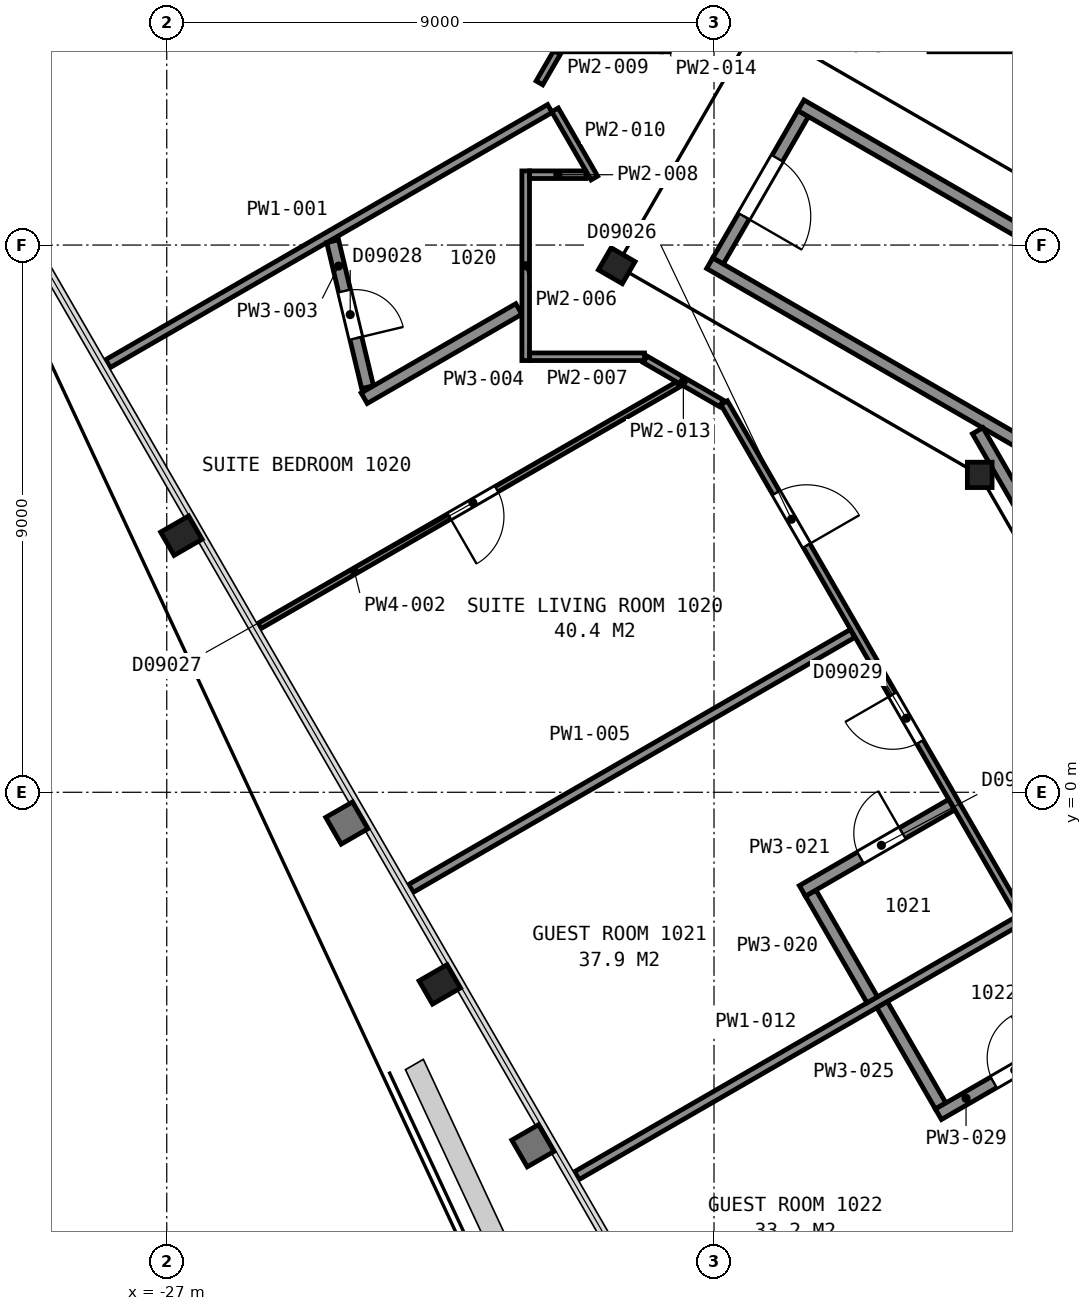
"""IFC4 building model, lengths in metres.
Left out: names, types, materials, properties, quantities, classifications, styles, units other than length and angle.
Written with IfcOpenShell. Run it as: python <this file> out.ifc"""

import sys

from ifc_helpers import new_model, si_unit, direction, frame, frame_2d, origin, origin_2d, place, context, subcontext, project, spatial, rectangle, i_section, extrude, element, fill, save


model = new_model("IFC4")
c1 = context("Model", 3, precision=1e-05, world=origin(), true_north=direction((0.0, 1.0)))
c2 = subcontext(c1, "Body", "Model", "MODEL_VIEW")
j1 = project(units=[si_unit("LENGTHUNIT", "METRE"), si_unit("PLANEANGLEUNIT", "RADIAN")], contexts=[c1])
p1 = place(None, origin())
s1 = spatial("IfcSite", under=j1, at=p1, CompositionType="ELEMENT")
p2 = place(p1, origin())
s2 = spatial("IfcBuilding", under=s1, at=p2, CompositionType="ELEMENT")
p3 = place(p2, frame((0.0, 0.0, 51.2)))
s3 = spatial("IfcBuildingStorey", under=s2, at=p3, CompositionType="ELEMENT", Elevation=51.2)
for number, where, z_axis, x_axis in (
    (1, (-26.76, 4.22, 0.0), (0.0, 0.0, 1.0), (-0.5, 0.866, 0.0)),
    (2, (-22.51, -3.16, 0.0), (0.0, 0.0, 1.0), (-0.5, 0.866, 0.0)),
):
    element("IfcColumn", number, at=place(p3, frame(where, z_axis=z_axis, x_axis=x_axis)), inside=s3, PredefinedType="COLUMN", context=c2, shape_type="SweptSolid", body=[
        extrude(i_section(OverallWidth=0.442, OverallDepth=0.531, WebThickness=0.066, FlangeThickness=0.106, FilletRadius=0.015, at=origin_2d()), origin(), (0.0, 0.0, 1.0), 3.6),
    ])
p4 = place(p3, frame((-19.6, 8.66, 0.0), z_axis=(0.0, 0.0, 1.0), x_axis=(0.5, 0.866025403784, 0.0)))
e3 = element("IfcColumn", 3, at=p4, inside=s3, PredefinedType="COLUMN", context=c2, shape_type="SweptSolid", body=[
    extrude(i_section(OverallWidth=0.419, OverallDepth=0.455, WebThickness=0.042, FlangeThickness=0.068, FilletRadius=0.015, at=origin_2d()), origin(), (0.0, 0.0, 1.0), 3.6),
])
p5 = place(p3, frame((-13.63, 5.22, 0.0), z_axis=(0.0, 0.0, 1.0), x_axis=(1.0, 0.0, 0.0)))
e4 = element("IfcColumn", 4, at=p5, inside=s3, PredefinedType="COLUMN", context=c2, shape_type="SweptSolid", body=[
    extrude(i_section(OverallWidth=0.406, OverallDepth=0.417, WebThickness=0.03, FlangeThickness=0.048, FilletRadius=0.015, at=origin_2d()), origin(), (0.0, 0.0, 1.0), 3.6),
])
p6 = place(p3, frame((-16.534, 11.162, 0.0), z_axis=(0.0, 0.0, 1.0), x_axis=(-0.49998411664, -0.866034573852, 0.0)))
e5 = element("IfcWall", 5, at=p6, inside=s3, PredefinedType="PARTITIONING", context=c2, shape_type="SweptSolid", body=[
    extrude(rectangle(XDim=2.8, YDim=0.2, at=frame_2d((1.4, 0.0))), origin(), (0.0, 0.0, 1.0), 3.35),
])
p7 = place(p6, frame((0.85, 0.0, 0.0)))
e6 = element("IfcOpeningElement", 6, at=p7, cuts=e5, PredefinedType="OPENING", context=c2, shape_type="SweptSolid", body=[
    extrude(rectangle(XDim=1.1, YDim=2.1, at=frame_2d((0.55, 1.05))), frame((0.0, 0.11, 0.0), z_axis=(0.0, -1.0, 0.0), x_axis=(1.0, 0.0, 0.0)), (0.0, 0.0, 1.0), 0.22),
])
for number, where, z_axis, x_axis in (
    (7, (-7.678, 2.701, 0.0), (0.0, 0.0, 1.0), (-0.866, 0.5, 0.0)),
    (8, (-6.178, 5.299, 0.0), (0.0, 0.0, 1.0), (-0.866, 0.5, 0.0)),
):
    element("IfcWall", number, at=place(p3, frame(where, z_axis=z_axis, x_axis=x_axis)), inside=s3, PredefinedType="PARTITIONING", context=c2, shape_type="SweptSolid", body=[
        extrude(rectangle(XDim=12.0, YDim=0.2, at=frame_2d((6.0, 0.0))), origin(), (0.0, 0.0, 1.0), 3.35),
    ])
p8 = place(p3, frame((-13.664, 5.946, 0.0), z_axis=(0.0, 0.0, 1.0), x_axis=(0.499994327219, -0.866028678941, 0.0)))
e9 = element("IfcWall", 9, at=p8, inside=s3, PredefinedType="PARTITIONING", context=c2, shape_type="SweptSolid", body=[
    extrude(rectangle(XDim=23.968, YDim=0.2, at=frame_2d((11.984, 0.0))), origin(), (0.0, 0.0, 1.0), 3.35),
])
p9 = place(p3, frame((-27.967, 7.05, 0.0), z_axis=(0.0, 0.0, 1.0), x_axis=(0.86603249375, 0.499987719618, 0.0)))
e10 = element("IfcWall", 10, at=p9, inside=s3, PredefinedType="PARTITIONING", context=c2, shape_type="SweptSolid", body=[
    extrude(rectangle(XDim=8.392, YDim=0.15, at=frame_2d((4.196, 0.0))), origin(), (0.0, 0.0, 1.0), 2.613),
])
p10 = place(p3, frame((-25.476, 2.735, 0.0), z_axis=(0.0, 0.0, 1.0), x_axis=(0.866077639848, 0.499909513568, 0.0)))
e11 = element("IfcWall", 11, at=p10, inside=s3, PredefinedType="PARTITIONING", context=c2, shape_type="SweptSolid", body=[
    extrude(rectangle(XDim=7.946, YDim=0.1, at=frame_2d((3.973, 0.0))), origin(), (0.0, 0.0, 1.0), 2.613),
])
p11 = place(p10, frame((3.604, 0.0, 0.0)))
e12 = element("IfcOpeningElement", 12, at=p11, cuts=e11, PredefinedType="OPENING", context=c2, shape_type="SweptSolid", body=[
    extrude(rectangle(XDim=0.9, YDim=2.1, at=frame_2d((0.45, 1.05))), frame((0.0, 0.06, 0.0), z_axis=(0.0, -1.0, 0.0), x_axis=(1.0, 0.0, 0.0)), (0.0, 0.0, 1.0), 0.12),
])
p12 = place(p3, frame((-24.272, 9.064, 0.0), z_axis=(0.0, 0.0, 1.0), x_axis=(0.232636237171, -0.972563818551, 0.0)))
e13 = element("IfcWall", 13, at=p12, inside=s3, PredefinedType="PARTITIONING", context=c2, shape_type="SweptSolid", body=[
    extrude(rectangle(XDim=2.469, YDim=0.2, at=frame_2d((1.235, 0.0))), origin(), (0.0, 0.0, 1.0), 2.613),
])
p13 = place(p12, frame((0.842, 0.0, 0.0)))
e14 = element("IfcOpeningElement", 14, at=p13, cuts=e13, PredefinedType="OPENING", context=c2, shape_type="SweptSolid", body=[
    extrude(rectangle(XDim=0.8, YDim=2.1, at=frame_2d((0.4, 1.05))), frame((0.0, 0.11, 0.0), z_axis=(0.0, -1.0, 0.0), x_axis=(1.0, 0.0, 0.0)), (0.0, 0.0, 1.0), 0.22),
])
p14 = place(p3, frame((-23.753, 6.481, 0.0), z_axis=(0.0, 0.0, 1.0), x_axis=(0.866070680301, 0.499921570572, 0.0)))
e15 = element("IfcWall", 15, at=p14, inside=s3, PredefinedType="PARTITIONING", context=c2, shape_type="SweptSolid", body=[
    extrude(rectangle(XDim=2.937, YDim=0.2, at=frame_2d((1.468, 0.0))), origin(), (0.0, 0.0, 1.0), 2.613),
])
p15 = place(p3, frame((-22.984, -1.581, 0.0), z_axis=(0.0, 0.0, 1.0), x_axis=(0.866040157966, 0.499974444137, 0.0)))
e16 = element("IfcWall", 16, at=p15, inside=s3, PredefinedType="PARTITIONING", context=c2, shape_type="SweptSolid", body=[
    extrude(rectangle(XDim=8.387, YDim=0.15, at=frame_2d((4.193, 0.0))), origin(), (0.0, 0.0, 1.0), 2.613),
])
p16 = place(p3, frame((-21.097, 7.101, 0.0), z_axis=(0.0, 0.0, 1.0), x_axis=(0.0, 1.0, 0.0)))
e17 = element("IfcWall", 17, at=p16, inside=s3, PredefinedType="PARTITIONING", context=c2, shape_type="SweptSolid", body=[
    extrude(rectangle(XDim=3.119, YDim=0.125, at=frame_2d((1.56, 0.0))), origin(), (0.0, 0.0, 1.0), 2.613),
])
p17 = place(p3, frame((-21.032, 7.163, 0.0), z_axis=(0.0, 0.0, 1.0), x_axis=(1.0, 0.0, 0.0)))
e18 = element("IfcWall", 18, at=p17, inside=s3, PredefinedType="PARTITIONING", context=c2, shape_type="SweptSolid", body=[
    extrude(rectangle(XDim=1.888, YDim=0.125, at=frame_2d((0.944, 0.0))), origin(), (0.0, 0.0, 1.0), 2.613),
])
p18 = place(p3, frame((-21.032, 10.157, 0.0), z_axis=(0.0, 0.0, 1.0), x_axis=(1.0, 0.0, 0.0)))
e19 = element("IfcWall", 19, at=p18, inside=s3, PredefinedType="PARTITIONING", context=c2, shape_type="SweptSolid", body=[
    extrude(rectangle(XDim=0.928, YDim=0.125, at=frame_2d((0.464, 0.0))), origin(), (0.0, 0.0, 1.0), 2.613),
])
p19 = place(p3, frame((-20.871, 11.667, 0.0), z_axis=(0.0, 0.0, 1.0), x_axis=(0.500769941337, 0.865580421367, 0.0)))
e20 = element("IfcWall", 20, at=p19, inside=s3, PredefinedType="PARTITIONING", context=c2, shape_type="SweptSolid", body=[
    extrude(rectangle(XDim=0.578, YDim=0.125, at=frame_2d((0.289, 0.0))), origin(), (0.0, 0.0, 1.0), 2.613),
])
p20 = place(p3, frame((-20.615, 11.223, 0.0), z_axis=(0.0, 0.0, 1.0), x_axis=(0.500076370288, -0.865981306888, 0.0)))
e21 = element("IfcWall", 21, at=p20, inside=s3, PredefinedType="PARTITIONING", context=c2, shape_type="SweptSolid", body=[
    extrude(rectangle(XDim=1.294, YDim=0.125, at=frame_2d((0.647, 0.0))), origin(), (0.0, 0.0, 1.0), 2.613),
])
p21 = place(p3, frame((-20.602, 12.241, 0.0), z_axis=(0.0, 0.0, 1.0), x_axis=(1.0, 0.0, 0.0)))
e22 = element("IfcWall", 22, at=p21, inside=s3, PredefinedType="PARTITIONING", context=c2, shape_type="SweptSolid", body=[
    extrude(rectangle(XDim=1.74, YDim=0.125, at=frame_2d((0.87, 0.0))), origin(), (0.0, 0.0, 1.0), 2.613),
])
p22 = place(p3, frame((-20.256, -6.305, 0.0), z_axis=(0.0, 0.0, 1.0), x_axis=(0.866037818403, 0.499978496633, 0.0)))
e23 = element("IfcWall", 23, at=p22, inside=s3, PredefinedType="PARTITIONING", context=c2, shape_type="SweptSolid", body=[
    extrude(rectangle(XDim=8.391, YDim=0.15, at=frame_2d((4.196, 0.0))), origin(), (0.0, 0.0, 1.0), 2.613),
])
p23 = place(p3, frame((-19.132, 7.121, 0.0), z_axis=(0.0, 0.0, 1.0), x_axis=(0.865894215669, -0.500227155672, 0.0)))
e24 = element("IfcWall", 24, at=p23, inside=s3, PredefinedType="PARTITIONING", context=c2, shape_type="SweptSolid", body=[
    extrude(rectangle(XDim=1.451, YDim=0.125, at=frame_2d((0.726, 0.0))), origin(), (0.0, 0.0, 1.0), 2.613),
])
p24 = place(p3, frame((-18.797, 12.178, 0.0), z_axis=(0.0, 0.0, 1.0), x_axis=(0.0, 1.0, 0.0)))
e25 = element("IfcWall", 25, at=p24, inside=s3, PredefinedType="PARTITIONING", context=c2, shape_type="SweptSolid", body=[
    extrude(rectangle(XDim=1.894, YDim=0.125, at=frame_2d((0.947, 0.0))), origin(), (0.0, 0.0, 1.0), 2.613),
])
p25 = place(p24, frame((0.562, 0.0, 0.0)))
e26 = element("IfcOpeningElement", 26, at=p25, cuts=e25, PredefinedType="OPENING", context=c2, shape_type="SweptSolid", body=[
    extrude(rectangle(XDim=0.9, YDim=2.1, at=frame_2d((0.45, 1.05))), frame((0.0, 0.073, 0.0), z_axis=(0.0, -1.0, 0.0), x_axis=(1.0, 0.0, 0.0)), (0.0, 0.0, 1.0), 0.145),
])
p26 = place(p3, frame((-3.766, -17.959, 0.0), z_axis=(0.0, 0.0, 1.0), x_axis=(-0.500002884005, 0.866023738697, 0.0)))
e27 = element("IfcWall", 27, at=p26, inside=s3, PredefinedType="PARTITIONING", context=c2, shape_type="SweptSolid", body=[
    extrude(rectangle(XDim=28.135, YDim=0.125, at=frame_2d((14.067, 0.0))), origin(), (0.0, 0.0, 1.0), 2.613),
])
p27 = place(p26, frame((25.422, 0.0, 0.0)))
e28 = element("IfcOpeningElement", 28, at=p27, cuts=e27, PredefinedType="OPENING", context=c2, shape_type="SweptSolid", body=[
    extrude(rectangle(XDim=1.0, YDim=2.1, at=frame_2d((0.5, 1.05))), frame((0.0, 0.073, 0.0), z_axis=(0.0, -1.0, 0.0), x_axis=(1.0, 0.0, 0.0)), (0.0, 0.0, 1.0), 0.145),
])
p28 = place(p26, frame((21.693, 0.0, 0.0)))
e29 = element("IfcOpeningElement", 29, at=p28, cuts=e27, PredefinedType="OPENING", context=c2, shape_type="SweptSolid", body=[
    extrude(rectangle(XDim=0.9, YDim=2.1, at=frame_2d((0.45, 1.05))), frame((0.0, 0.073, 0.0), z_axis=(0.0, -1.0, 0.0), x_axis=(1.0, 0.0, 0.0)), (0.0, 0.0, 1.0), 0.145),
])
p29 = place(p26, frame((14.438, 0.0, 0.0)))
e30 = element("IfcOpeningElement", 30, at=p29, cuts=e27, PredefinedType="OPENING", context=c2, shape_type="SweptSolid", body=[
    extrude(rectangle(XDim=0.9, YDim=2.1, at=frame_2d((0.45, 1.05))), frame((0.0, 0.073, 0.0), z_axis=(0.0, -1.0, 0.0), x_axis=(1.0, 0.0, 0.0)), (0.0, 0.0, 1.0), 0.145),
])
p30 = place(p26, frame((11.712, 0.0, 0.0)))
e31 = element("IfcOpeningElement", 31, at=p30, cuts=e27, PredefinedType="OPENING", context=c2, shape_type="SweptSolid", body=[
    extrude(rectangle(XDim=0.9, YDim=2.1, at=frame_2d((0.45, 1.05))), frame((0.0, 0.073, 0.0), z_axis=(0.0, -1.0, 0.0), x_axis=(1.0, 0.0, 0.0)), (0.0, 0.0, 1.0), 0.145),
])
p31 = place(p26, frame((4.787, 0.0, 0.0)))
e32 = element("IfcOpeningElement", 32, at=p31, cuts=e27, PredefinedType="OPENING", context=c2, shape_type="SweptSolid", body=[
    extrude(rectangle(XDim=0.9, YDim=2.1, at=frame_2d((0.45, 1.05))), frame((0.0, 0.073, 0.0), z_axis=(0.0, -1.0, 0.0), x_axis=(1.0, 0.0, 0.0)), (0.0, 0.0, 1.0), 0.145),
])
p32 = place(p26, frame((1.762, 0.0, 0.0)))
e33 = element("IfcOpeningElement", 33, at=p32, cuts=e27, PredefinedType="OPENING", context=c2, shape_type="SweptSolid", body=[
    extrude(rectangle(XDim=0.9, YDim=2.1, at=frame_2d((0.45, 1.05))), frame((0.0, 0.073, 0.0), z_axis=(0.0, -1.0, 0.0), x_axis=(1.0, 0.0, 0.0)), (0.0, 0.0, 1.0), 0.145),
])
p33 = place(p3, frame((-17.844, -10.484, 0.0), z_axis=(0.0, 0.0, 1.0), x_axis=(0.866037818403, 0.499978496633, 0.0)))
e34 = element("IfcWall", 34, at=p33, inside=s3, PredefinedType="PARTITIONING", context=c2, shape_type="SweptSolid", body=[
    extrude(rectangle(XDim=8.391, YDim=0.15, at=frame_2d((4.196, 0.0))), origin(), (0.0, 0.0, 1.0), 2.613),
])
p34 = place(p3, frame((-16.41, -1.659, 0.0), z_axis=(0.0, 0.0, 1.0), x_axis=(0.49983374806, -0.866121368112, 0.0)))
e35 = element("IfcWall", 35, at=p34, inside=s3, PredefinedType="PARTITIONING", context=c2, shape_type="SweptSolid", body=[
    extrude(rectangle(XDim=2.026, YDim=0.2, at=frame_2d((1.013, 0.0))), origin(), (0.0, 0.0, 1.0), 2.613),
])
p35 = place(p3, frame((-14.094, -0.206, 0.0), z_axis=(0.0, 0.0, 1.0), x_axis=(-0.866033446572, -0.499986069224, 0.0)))
e36 = element("IfcWall", 36, at=p35, inside=s3, PredefinedType="PARTITIONING", context=c2, shape_type="SweptSolid", body=[
    extrude(rectangle(XDim=2.833, YDim=0.2, at=frame_2d((1.416, 0.0))), origin(), (0.0, 0.0, 1.0), 2.613),
])
p36 = place(p35, frame((0.933, 0.0, 0.0)))
e37 = element("IfcOpeningElement", 37, at=p36, cuts=e36, PredefinedType="OPENING", context=c2, shape_type="SweptSolid", body=[
    extrude(rectangle(XDim=0.8, YDim=2.1, at=frame_2d((0.4, 1.05))), frame((0.0, 0.11, 0.0), z_axis=(0.0, -1.0, 0.0), x_axis=(1.0, 0.0, 0.0)), (0.0, 0.0, 1.0), 0.22),
])
p37 = place(p3, frame((-15.236, -3.493, 0.0), z_axis=(0.0, 0.0, 1.0), x_axis=(0.500190942922, -0.865915134767, 0.0)))
e38 = element("IfcWall", 38, at=p37, inside=s3, PredefinedType="PARTITIONING", context=c2, shape_type="SweptSolid", body=[
    extrude(rectangle(XDim=1.925, YDim=0.2, at=frame_2d((0.962, 0.0))), origin(), (0.0, 0.0, 1.0), 2.613),
])
p38 = place(p3, frame((-14.465, 12.241, 0.0), z_axis=(0.0, 0.0, 1.0), x_axis=(1.0, 0.0, 0.0)))
e39 = element("IfcWall", 39, at=p38, inside=s3, PredefinedType="PARTITIONING", context=c2, shape_type="SweptSolid", body=[
    extrude(rectangle(XDim=28.929, YDim=0.125, at=frame_2d((14.465, 0.0))), origin(), (0.0, 0.0, 1.0), 2.613),
])
p39 = place(p38, frame((25.252, 0.0, 0.0)))
e40 = element("IfcOpeningElement", 40, at=p39, cuts=e39, PredefinedType="OPENING", context=c2, shape_type="SweptSolid", body=[
    extrude(rectangle(XDim=0.9, YDim=2.1, at=frame_2d((0.45, 1.05))), frame((0.0, 0.073, 0.0), z_axis=(0.0, -1.0, 0.0), x_axis=(1.0, 0.0, 0.0)), (0.0, 0.0, 1.0), 0.145),
])
p40 = place(p38, frame((22.564, 0.0, 0.0)))
e41 = element("IfcOpeningElement", 41, at=p40, cuts=e39, PredefinedType="OPENING", context=c2, shape_type="SweptSolid", body=[
    extrude(rectangle(XDim=0.9, YDim=2.1, at=frame_2d((0.45, 1.05))), frame((0.0, 0.073, 0.0), z_axis=(0.0, -1.0, 0.0), x_axis=(1.0, 0.0, 0.0)), (0.0, 0.0, 1.0), 0.145),
])
p41 = place(p38, frame((15.302, 0.0, 0.0)))
e42 = element("IfcOpeningElement", 42, at=p41, cuts=e39, PredefinedType="OPENING", context=c2, shape_type="SweptSolid", body=[
    extrude(rectangle(XDim=0.9, YDim=2.1, at=frame_2d((0.45, 1.05))), frame((0.0, 0.073, 0.0), z_axis=(0.0, -1.0, 0.0), x_axis=(1.0, 0.0, 0.0)), (0.0, 0.0, 1.0), 0.145),
])
p42 = place(p38, frame((12.365, 0.0, 0.0)))
e43 = element("IfcOpeningElement", 43, at=p42, cuts=e39, PredefinedType="OPENING", context=c2, shape_type="SweptSolid", body=[
    extrude(rectangle(XDim=0.9, YDim=2.1, at=frame_2d((0.45, 1.05))), frame((0.0, 0.073, 0.0), z_axis=(0.0, -1.0, 0.0), x_axis=(1.0, 0.0, 0.0)), (0.0, 0.0, 1.0), 0.145),
])
p43 = place(p38, frame((5.477, 0.0, 0.0)))
e44 = element("IfcOpeningElement", 44, at=p43, cuts=e39, PredefinedType="OPENING", context=c2, shape_type="SweptSolid", body=[
    extrude(rectangle(XDim=0.9, YDim=2.1, at=frame_2d((0.45, 1.05))), frame((0.0, 0.073, 0.0), z_axis=(0.0, -1.0, 0.0), x_axis=(1.0, 0.0, 0.0)), (0.0, 0.0, 1.0), 0.145),
])
p44 = place(p38, frame((2.789, 0.0, 0.0)))
e45 = element("IfcOpeningElement", 45, at=p44, cuts=e39, PredefinedType="OPENING", context=c2, shape_type="SweptSolid", body=[
    extrude(rectangle(XDim=0.9, YDim=2.1, at=frame_2d((0.45, 1.05))), frame((0.0, 0.073, 0.0), z_axis=(0.0, -1.0, 0.0), x_axis=(1.0, 0.0, 0.0)), (0.0, 0.0, 1.0), 0.145),
])
p45 = place(p3, frame((-14.31, -5.296, 0.0), z_axis=(0.0, 0.0, 1.0), x_axis=(0.866012976267, 0.500021524473, 0.0)))
e46 = element("IfcWall", 46, at=p45, inside=s3, PredefinedType="PARTITIONING", context=c2, shape_type="SweptSolid", body=[
    extrude(rectangle(XDim=2.732, YDim=0.2, at=frame_2d((1.366, 0.0))), origin(), (0.0, 0.0, 1.0), 2.613),
])
p46 = place(p45, frame((1.05, 0.0, 0.0)))
e47 = element("IfcOpeningElement", 47, at=p46, cuts=e46, PredefinedType="OPENING", context=c2, shape_type="SweptSolid", body=[
    extrude(rectangle(XDim=0.8, YDim=2.1, at=frame_2d((0.4, 1.05))), frame((0.0, 0.11, 0.0), z_axis=(0.0, -1.0, 0.0), x_axis=(1.0, 0.0, 0.0)), (0.0, 0.0, 1.0), 0.22),
])
p47 = place(p7, origin())
e48 = element("IfcDoor", 48, at=p47, inside=s3, OperationType="SINGLE_SWING_RIGHT", PredefinedType="DOOR", context=c2, shape_type="SweptSolid", body=[
    extrude(rectangle(XDim=1.1, YDim=2.1, at=frame_2d((0.55, 1.05))), frame((0.0, 0.025, 0.0), z_axis=(0.0, -1.0, 0.0), x_axis=(1.0, 0.0, 0.0)), (0.0, 0.0, 1.0), 0.05),
])
fill(e6, e48)
p48 = place(p11, origin())
e49 = element("IfcDoor", 49, at=p48, inside=s3, OperationType="SINGLE_SWING_LEFT", PredefinedType="DOOR", context=c2, shape_type="SweptSolid", body=[
    extrude(rectangle(XDim=0.9, YDim=2.1, at=frame_2d((0.45, 1.05))), frame((0.0, 0.025, 0.0), z_axis=(0.0, -1.0, 0.0), x_axis=(1.0, 0.0, 0.0)), (0.0, 0.0, 1.0), 0.05),
])
fill(e12, e49)
p49 = place(p13, origin())
e50 = element("IfcDoor", 50, at=p49, inside=s3, OperationType="SINGLE_SWING_RIGHT", PredefinedType="DOOR", context=c2, shape_type="SweptSolid", body=[
    extrude(rectangle(XDim=0.8, YDim=2.1, at=frame_2d((0.4, 1.05))), frame((0.0, 0.025, 0.0), z_axis=(0.0, -1.0, 0.0), x_axis=(1.0, 0.0, 0.0)), (0.0, 0.0, 1.0), 0.05),
])
fill(e14, e50)
p50 = place(p27, origin())
e51 = element("IfcDoor", 51, at=p50, inside=s3, OperationType="SINGLE_SWING_LEFT", PredefinedType="DOOR", context=c2, shape_type="SweptSolid", body=[
    extrude(rectangle(XDim=1.0, YDim=2.1, at=frame_2d((0.5, 1.05))), frame((0.0, 0.025, 0.0), z_axis=(0.0, -1.0, 0.0), x_axis=(1.0, 0.0, 0.0)), (0.0, 0.0, 1.0), 0.05),
])
fill(e28, e51)
p51 = place(p28, origin())
e52 = element("IfcDoor", 52, at=p51, inside=s3, OperationType="SINGLE_SWING_RIGHT", PredefinedType="DOOR", context=c2, shape_type="SweptSolid", body=[
    extrude(rectangle(XDim=0.9, YDim=2.1, at=frame_2d((0.45, 1.05))), frame((0.0, 0.025, 0.0), z_axis=(0.0, -1.0, 0.0), x_axis=(1.0, 0.0, 0.0)), (0.0, 0.0, 1.0), 0.05),
])
fill(e29, e52)
p52 = place(p36, origin())
e53 = element("IfcDoor", 53, at=p52, inside=s3, OperationType="SINGLE_SWING_LEFT", PredefinedType="DOOR", context=c2, shape_type="SweptSolid", body=[
    extrude(rectangle(XDim=0.8, YDim=2.1, at=frame_2d((0.4, 1.05))), frame((0.0, 0.025, 0.0), z_axis=(0.0, -1.0, 0.0), x_axis=(1.0, 0.0, 0.0)), (0.0, 0.0, 1.0), 0.05),
])
fill(e37, e53)
p53 = place(p46, origin())
e54 = element("IfcDoor", 54, at=p53, inside=s3, OperationType="SINGLE_SWING_RIGHT", PredefinedType="DOOR", context=c2, shape_type="SweptSolid", body=[
    extrude(rectangle(XDim=0.8, YDim=2.1, at=frame_2d((0.4, 1.05))), frame((0.0, 0.025, 0.0), z_axis=(0.0, -1.0, 0.0), x_axis=(1.0, 0.0, 0.0)), (0.0, 0.0, 1.0), 0.05),
])
fill(e47, e54)
save(model, sys.argv[1])
